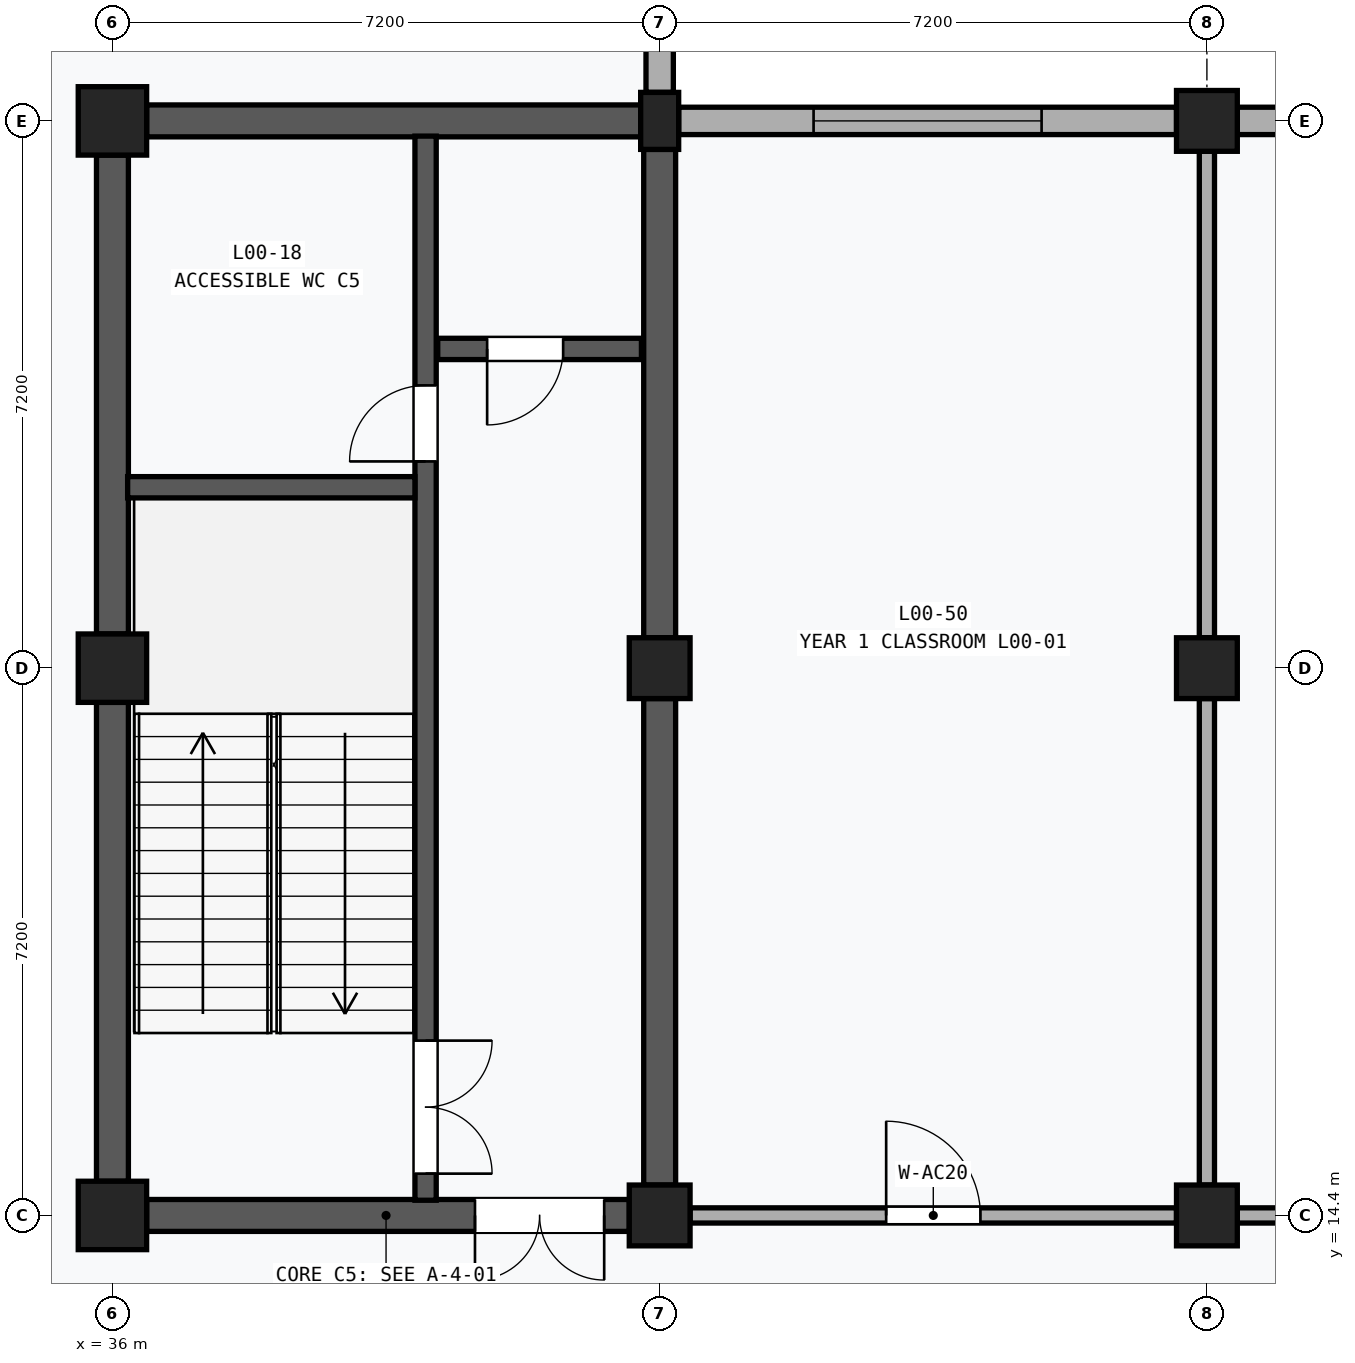
"""IFC4 building model, lengths in metres.
Left out: names, types, materials, properties, quantities, classifications, styles, units other than length and angle.
Written with IfcOpenShell. Run it as: python <this file> out.ifc"""

import sys

from ifc_helpers import new_model, si_unit, direction, frame, frame_2d, origin, origin_2d, place, context, subcontext, project, spatial, rectangle, extrude, element, fill, save


model = new_model("IFC4")
c1 = context("Model", 3, precision=1e-05, world=origin(), true_north=direction((0.0, 1.0)))
c2 = subcontext(c1, "Body", "Model", "MODEL_VIEW")
j1 = project(units=[si_unit("LENGTHUNIT", "METRE"), si_unit("PLANEANGLEUNIT", "RADIAN")], contexts=[c1])
p1 = place(None, origin())
s1 = spatial("IfcSite", under=j1, at=p1, CompositionType="ELEMENT")
p2 = place(p1, origin())
s2 = spatial("IfcBuilding", under=s1, at=p2, CompositionType="ELEMENT")
p3 = place(p2, origin())
s3 = spatial("IfcBuildingStorey", under=s2, at=p3, CompositionType="ELEMENT", Elevation=0.0)
for number, where, z_axis, x_axis in (
    (1, (36.0, 14.4, 0.0), (0.0, 0.0, 1.0), (1.0, 0.0, 0.0)),
    (2, (36.0, 21.6, 0.0), (0.0, 0.0, 1.0), (1.0, 0.0, 0.0)),
    (3, (36.0, 28.8, 0.0), (0.0, 0.0, 1.0), (1.0, 0.0, 0.0)),
):
    element("IfcColumn", number, at=place(p3, frame(where, z_axis=z_axis, x_axis=x_axis)), inside=s3, PredefinedType="COLUMN", context=c2, shape_type="SweptSolid", body=[
        extrude(rectangle(XDim=0.9, YDim=0.9, at=origin_2d()), origin(), (0.0, 0.0, 1.0), 4.8),
    ])
for number, where, z_axis, x_axis in (
    (4, (43.2, 14.4, 0.0), (0.0, 0.0, 1.0), (1.0, 0.0, 0.0)),
    (5, (43.2, 21.6, 0.0), (0.0, 0.0, 1.0), (1.0, 0.0, 0.0)),
):
    element("IfcColumn", number, at=place(p3, frame(where, z_axis=z_axis, x_axis=x_axis)), inside=s3, PredefinedType="COLUMN", context=c2, shape_type="SweptSolid", body=[
        extrude(rectangle(XDim=0.8, YDim=0.8, at=origin_2d()), origin(), (0.0, 0.0, 1.0), 4.8),
    ])
p4 = place(p3, frame((43.2, 28.8, 0.0), z_axis=(0.0, 0.0, 1.0), x_axis=(1.0, 0.0, 0.0)))
e6 = element("IfcColumn", 6, at=p4, inside=s3, PredefinedType="PILASTER", context=c2, shape_type="SweptSolid", body=[
    extrude(rectangle(XDim=0.5, YDim=0.75, at=origin_2d()), origin(), (0.0, 0.0, 1.0), 4.8),
])
for number, where, z_axis, x_axis in (
    (7, (50.4, 14.4, 0.0), (0.0, 0.0, 1.0), (1.0, 0.0, 0.0)),
    (8, (50.4, 21.6, 0.0), (0.0, 0.0, 1.0), (1.0, 0.0, 0.0)),
    (9, (50.4, 28.8, 0.0), (0.0, 0.0, 1.0), (1.0, 0.0, 0.0)),
):
    element("IfcColumn", number, at=place(p3, frame(where, z_axis=z_axis, x_axis=x_axis)), inside=s3, PredefinedType="COLUMN", context=c2, shape_type="SweptSolid", body=[
        extrude(rectangle(XDim=0.8, YDim=0.8, at=origin_2d()), origin(), (0.0, 0.0, 1.0), 4.8),
    ])
p5 = place(p3, frame((43.2, 29.175, 0.0), z_axis=(0.0, 0.0, 1.0), x_axis=(0.0, 1.0, 0.0)))
e10 = element("IfcWall", 10, at=p5, inside=s3, PredefinedType="SOLIDWALL", context=c2, shape_type="SweptSolid", body=[
    extrude(rectangle(XDim=6.425, YDim=0.36, at=frame_2d((3.212, 0.0))), origin(), (0.0, 0.0, 1.0), 3.89),
])
p6 = place(p5, frame((1.712, 0.0, 0.85)))
e11 = element("IfcOpeningElement", 11, at=p6, cuts=e10, PredefinedType="OPENING", context=c2, shape_type="SweptSolid", body=[
    extrude(rectangle(XDim=3.0, YDim=2.0, at=frame_2d((1.5, 1.0))), frame((0.0, 0.192, 0.0), z_axis=(0.0, -1.0, 0.0), x_axis=(1.0, 0.0, 0.0)), (0.0, 0.0, 1.0), 0.384),
])
p7 = place(p3, frame((43.45, 28.8, 0.0), z_axis=(0.0, 0.0, 1.0), x_axis=(1.0, 0.0, 0.0)))
e12 = element("IfcWall", 12, at=p7, inside=s3, PredefinedType="SOLIDWALL", context=c2, shape_type="SweptSolid", body=[
    extrude(rectangle(XDim=6.55, YDim=0.36, at=frame_2d((3.275, 0.0))), origin(), (0.0, 0.0, 1.0), 3.89),
])
p8 = place(p7, frame((1.775, 0.0, 0.85)))
e13 = element("IfcOpeningElement", 13, at=p8, cuts=e12, PredefinedType="OPENING", context=c2, shape_type="SweptSolid", body=[
    extrude(rectangle(XDim=3.0, YDim=2.0, at=frame_2d((1.5, 1.0))), frame((0.0, 0.192, 0.0), z_axis=(0.0, -1.0, 0.0), x_axis=(1.0, 0.0, 0.0)), (0.0, 0.0, 1.0), 0.384),
])
p9 = place(p3, frame((50.8, 28.8, 0.0), z_axis=(0.0, 0.0, 1.0), x_axis=(1.0, 0.0, 0.0)))
e14 = element("IfcWall", 14, at=p9, inside=s3, PredefinedType="SOLIDWALL", context=c2, shape_type="SweptSolid", body=[
    extrude(rectangle(XDim=6.4, YDim=0.36, at=frame_2d((3.2, 0.0))), origin(), (0.0, 0.0, 1.0), 3.89),
])
p10 = place(p9, frame((1.55, 0.0, 0.85)))
e15 = element("IfcOpeningElement", 15, at=p10, cuts=e14, PredefinedType="OPENING", context=c2, shape_type="SweptSolid", body=[
    extrude(rectangle(XDim=3.3, YDim=2.0, at=frame_2d((1.65, 1.0))), frame((0.0, 0.192, 0.0), z_axis=(0.0, -1.0, 0.0), x_axis=(1.0, 0.0, 0.0)), (0.0, 0.0, 1.0), 0.384),
])
p11 = place(p3, frame((36.0, 14.85, 0.0), z_axis=(0.0, 0.0, 1.0), x_axis=(0.0, 1.0, 0.0)))
e16 = element("IfcWall", 16, at=p11, inside=s3, PredefinedType="SHEAR", context=c2, shape_type="SweptSolid", body=[
    extrude(rectangle(XDim=6.3, YDim=0.42, at=frame_2d((3.15, 0.0))), origin(), (0.0, 0.0, 1.0), 3.62),
])
p12 = place(p3, frame((36.0, 22.05, 0.0), z_axis=(0.0, 0.0, 1.0), x_axis=(0.0, 1.0, 0.0)))
e17 = element("IfcWall", 17, at=p12, inside=s3, PredefinedType="SHEAR", context=c2, shape_type="SweptSolid", body=[
    extrude(rectangle(XDim=6.3, YDim=0.42, at=frame_2d((3.15, 0.0))), origin(), (0.0, 0.0, 1.0), 3.62),
])
p13 = place(p3, frame((43.2, 14.8, 0.0), z_axis=(0.0, 0.0, 1.0), x_axis=(0.0, 1.0, 0.0)))
e18 = element("IfcWall", 18, at=p13, inside=s3, PredefinedType="SHEAR", context=c2, shape_type="SweptSolid", body=[
    extrude(rectangle(XDim=6.4, YDim=0.42, at=frame_2d((3.2, 0.0))), origin(), (0.0, 0.0, 1.0), 3.62),
])
p14 = place(p3, frame((43.2, 22.0, 0.0), z_axis=(0.0, 0.0, 1.0), x_axis=(0.0, 1.0, 0.0)))
e19 = element("IfcWall", 19, at=p14, inside=s3, PredefinedType="SHEAR", context=c2, shape_type="SweptSolid", body=[
    extrude(rectangle(XDim=6.425, YDim=0.42, at=frame_2d((3.212, 0.0))), origin(), (0.0, 0.0, 1.0), 3.62),
])
p15 = place(p3, frame((36.45, 14.4, 0.0), z_axis=(0.0, 0.0, 1.0), x_axis=(1.0, 0.0, 0.0)))
e20 = element("IfcWall", 20, at=p15, inside=s3, PredefinedType="SHEAR", context=c2, shape_type="SweptSolid", body=[
    extrude(rectangle(XDim=6.35, YDim=0.42, at=frame_2d((3.175, 0.0))), origin(), (0.0, 0.0, 1.0), 3.62),
])
p16 = place(p15, frame((4.32, 0.0, 0.0)))
e21 = element("IfcOpeningElement", 21, at=p16, cuts=e20, PredefinedType="OPENING", context=c2, shape_type="SweptSolid", body=[
    extrude(rectangle(XDim=1.7, YDim=2.25, at=frame_2d((0.85, 1.125))), frame((0.0, 0.222, 0.0), z_axis=(0.0, -1.0, 0.0), x_axis=(1.0, 0.0, 0.0)), (0.0, 0.0, 1.0), 0.444),
])
p17 = place(p3, frame((36.45, 28.8, 0.0), z_axis=(0.0, 0.0, 1.0), x_axis=(1.0, 0.0, 0.0)))
e22 = element("IfcWall", 22, at=p17, inside=s3, PredefinedType="SHEAR", context=c2, shape_type="SweptSolid", body=[
    extrude(rectangle(XDim=6.5, YDim=0.42, at=frame_2d((3.25, 0.0))), origin(), (0.0, 0.0, 1.0), 3.62),
])
p18 = place(p3, frame((40.12, 14.6, 0.0), z_axis=(0.0, 0.0, 1.0), x_axis=(0.0, 1.0, 0.0)))
e23 = element("IfcWall", 23, at=p18, inside=s3, PredefinedType="SHEAR", context=c2, shape_type="SweptSolid", body=[
    extrude(rectangle(XDim=14.0, YDim=0.28, at=frame_2d((7.0, 0.0))), origin(), (0.0, 0.0, 1.0), 4.52),
])
p19 = place(p18, frame((0.35, 0.0, 0.0)))
e24 = element("IfcOpeningElement", 24, at=p19, cuts=e23, PredefinedType="OPENING", context=c2, shape_type="SweptSolid", body=[
    extrude(rectangle(XDim=1.75, YDim=2.15, at=frame_2d((0.875, 1.075))), frame((0.0, 0.152, 0.0), z_axis=(0.0, -1.0, 0.0), x_axis=(1.0, 0.0, 0.0)), (0.0, 0.0, 1.0), 0.304),
])
p20 = place(p18, frame((9.72, 0.0, 0.0)))
e25 = element("IfcOpeningElement", 25, at=p20, cuts=e23, PredefinedType="OPENING", context=c2, shape_type="SweptSolid", body=[
    extrude(rectangle(XDim=1.0, YDim=2.15, at=frame_2d((0.5, 1.075))), frame((0.0, 0.152, 0.0), z_axis=(0.0, -1.0, 0.0), x_axis=(1.0, 0.0, 0.0)), (0.0, 0.0, 1.0), 0.304),
])
p21 = place(p3, frame((36.2, 23.98, 0.0), z_axis=(0.0, 0.0, 1.0), x_axis=(1.0, 0.0, 0.0)))
e26 = element("IfcWall", 26, at=p21, inside=s3, PredefinedType="SHEAR", context=c2, shape_type="SweptSolid", body=[
    extrude(rectangle(XDim=3.78, YDim=0.28, at=frame_2d((1.89, 0.0))), origin(), (0.0, 0.0, 1.0), 4.52),
])
p22 = place(p3, frame((40.28, 25.8, 0.0), z_axis=(0.0, 0.0, 1.0), x_axis=(1.0, 0.0, 0.0)))
e27 = element("IfcWall", 27, at=p22, inside=s3, PredefinedType="SHEAR", context=c2, shape_type="SweptSolid", body=[
    extrude(rectangle(XDim=2.68, YDim=0.28, at=frame_2d((1.34, 0.0))), origin(), (0.0, 0.0, 1.0), 4.52),
])
p23 = place(p22, frame((0.65, 0.0, 0.0)))
e28 = element("IfcOpeningElement", 28, at=p23, cuts=e27, PredefinedType="OPENING", context=c2, shape_type="SweptSolid", body=[
    extrude(rectangle(XDim=1.0, YDim=2.15, at=frame_2d((0.5, 1.075))), frame((0.0, 0.152, 0.0), z_axis=(0.0, -1.0, 0.0), x_axis=(1.0, 0.0, 0.0)), (0.0, 0.0, 1.0), 0.304),
])
p24 = place(p3, frame((43.6, 14.4, 0.0), z_axis=(0.0, 0.0, 1.0), x_axis=(1.0, 0.0, 0.0)))
e29 = element("IfcWall", 29, at=p24, inside=s3, PredefinedType="PARTITIONING", context=c2, shape_type="SweptSolid", body=[
    extrude(rectangle(XDim=6.4, YDim=0.2, at=frame_2d((3.2, 0.0))), origin(), (0.0, 0.0, 1.0), 3.62),
])
p25 = place(p24, frame((2.58, 0.0, 0.0)))
e30 = element("IfcOpeningElement", 30, at=p25, cuts=e29, PredefinedType="OPENING", context=c2, shape_type="SweptSolid", body=[
    extrude(rectangle(XDim=1.24, YDim=2.26, at=frame_2d((0.62, 1.13))), frame((0.0, 0.112, 0.0), z_axis=(0.0, -1.0, 0.0), x_axis=(1.0, 0.0, 0.0)), (0.0, 0.0, 1.0), 0.224),
])
for number, where, z_axis, x_axis in (
    (31, (50.4, 14.8, 0.0), (0.0, 0.0, 1.0), (0.0, 1.0, 0.0)),
    (32, (50.4, 22.0, 0.0), (0.0, 0.0, 1.0), (0.0, 1.0, 0.0)),
):
    element("IfcWall", number, at=place(p3, frame(where, z_axis=z_axis, x_axis=x_axis)), inside=s3, PredefinedType="PARTITIONING", context=c2, shape_type="SweptSolid", body=[
        extrude(rectangle(XDim=6.4, YDim=0.2, at=frame_2d((3.2, 0.0))), origin(), (0.0, 0.0, 1.0), 3.62),
    ])
p26 = place(p3, frame((50.8, 14.4, 0.0), z_axis=(0.0, 0.0, 1.0), x_axis=(1.0, 0.0, 0.0)))
e33 = element("IfcWall", 33, at=p26, inside=s3, PredefinedType="PARTITIONING", context=c2, shape_type="SweptSolid", body=[
    extrude(rectangle(XDim=6.4, YDim=0.2, at=frame_2d((3.2, 0.0))), origin(), (0.0, 0.0, 1.0), 3.62),
])
p27 = place(p26, frame((2.56, 0.0, 0.0)))
e34 = element("IfcOpeningElement", 34, at=p27, cuts=e33, PredefinedType="OPENING", context=c2, shape_type="SweptSolid", body=[
    extrude(rectangle(XDim=1.28, YDim=2.28, at=frame_2d((0.64, 1.14))), frame((0.0, 0.112, 0.0), z_axis=(0.0, -1.0, 0.0), x_axis=(1.0, 0.0, 0.0)), (0.0, 0.0, 1.0), 0.224),
])
p28 = place(p8, origin())
e35 = element("IfcWindow", 35, at=p28, inside=s3, PartitioningType="SINGLE_PANEL", PredefinedType="WINDOW", context=c2, shape_type="SweptSolid", body=[
    extrude(rectangle(XDim=3.0, YDim=2.0, at=frame_2d((1.5, 1.0))), frame((0.0, 0.03, 0.0), z_axis=(0.0, -1.0, 0.0), x_axis=(1.0, 0.0, 0.0)), (0.0, 0.0, 1.0), 0.06),
])
fill(e13, e35)
p29 = place(p16, frame((1.7, 0.0, 0.0), z_axis=(0.0, 0.0, 1.0), x_axis=(-1.0, 0.0, 0.0)))
e36 = element("IfcDoor", 36, at=p29, inside=s3, OperationType="DOUBLE_DOOR_SINGLE_SWING", PredefinedType="DOOR", context=c2, shape_type="SweptSolid", body=[
    extrude(rectangle(XDim=1.7, YDim=2.25, at=frame_2d((0.85, 1.125))), frame((0.0, 0.025, 0.0), z_axis=(0.0, -1.0, 0.0), x_axis=(1.0, 0.0, 0.0)), (0.0, 0.0, 1.0), 0.05),
])
fill(e21, e36)
p30 = place(p19, frame((1.75, 0.0, 0.0), z_axis=(0.0, 0.0, 1.0), x_axis=(-1.0, 0.0, 0.0)))
e37 = element("IfcDoor", 37, at=p30, inside=s3, OperationType="DOUBLE_DOOR_SINGLE_SWING", PredefinedType="DOOR", context=c2, shape_type="SweptSolid", body=[
    extrude(rectangle(XDim=1.75, YDim=2.15, at=frame_2d((0.875, 1.075))), frame((0.0, 0.025, 0.0), z_axis=(0.0, -1.0, 0.0), x_axis=(1.0, 0.0, 0.0)), (0.0, 0.0, 1.0), 0.05),
])
fill(e24, e37)
p31 = place(p20, origin())
e38 = element("IfcDoor", 38, at=p31, inside=s3, OperationType="SINGLE_SWING_LEFT", PredefinedType="DOOR", context=c2, shape_type="SweptSolid", body=[
    extrude(rectangle(XDim=1.0, YDim=2.15, at=frame_2d((0.5, 1.075))), frame((0.0, 0.025, 0.0), z_axis=(0.0, -1.0, 0.0), x_axis=(1.0, 0.0, 0.0)), (0.0, 0.0, 1.0), 0.05),
])
fill(e25, e38)
p32 = place(p23, frame((1.0, 0.0, 0.0), z_axis=(0.0, 0.0, 1.0), x_axis=(-1.0, 0.0, 0.0)))
e39 = element("IfcDoor", 39, at=p32, inside=s3, OperationType="SINGLE_SWING_RIGHT", PredefinedType="DOOR", context=c2, shape_type="SweptSolid", body=[
    extrude(rectangle(XDim=1.0, YDim=2.15, at=frame_2d((0.5, 1.075))), frame((0.0, 0.025, 0.0), z_axis=(0.0, -1.0, 0.0), x_axis=(1.0, 0.0, 0.0)), (0.0, 0.0, 1.0), 0.05),
])
fill(e28, e39)
p33 = place(p25, origin())
e40 = element("IfcDoor", 40, at=p33, inside=s3, OperationType="SINGLE_SWING_LEFT", PredefinedType="DOOR", context=c2, shape_type="SweptSolid", body=[
    extrude(rectangle(XDim=1.24, YDim=2.26, at=frame_2d((0.62, 1.13))), frame((0.0, 0.025, 0.0), z_axis=(0.0, -1.0, 0.0), x_axis=(1.0, 0.0, 0.0)), (0.0, 0.0, 1.0), 0.05),
])
fill(e30, e40)
save(model, sys.argv[1])
